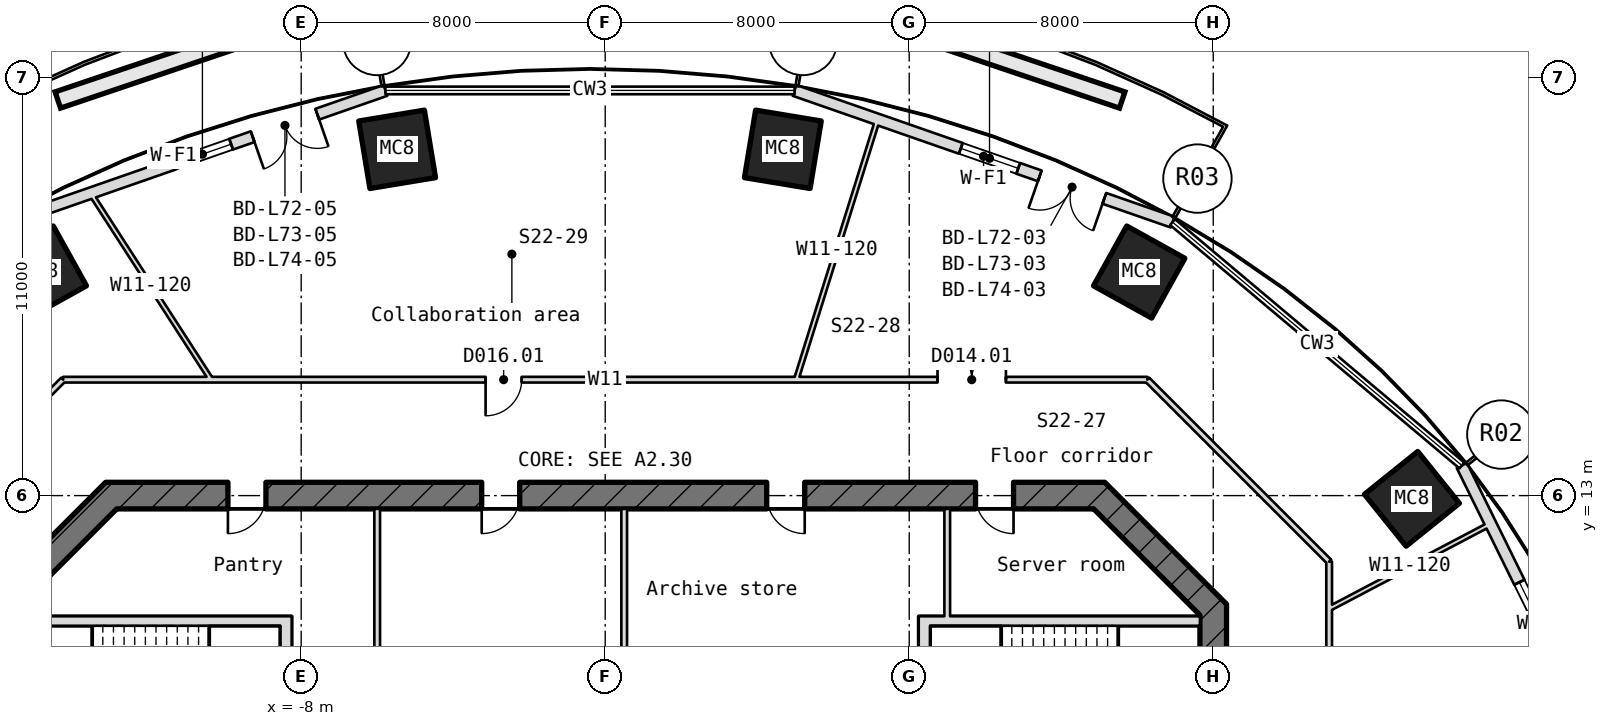
"""IFC4 building model, lengths in metres.
Left out: names, types, materials, properties, quantities, classifications, styles, units other than length and angle.
Written with IfcOpenShell. Run it as: python <this file> out.ifc"""

import sys

from ifc_helpers import new_model, si_unit, direction, frame, frame_2d, origin, origin_2d, place, context, subcontext, project, spatial, rectangle, hollow_rectangle, extrude, element, fill, save


model = new_model("IFC4")
c1 = context("Model", 3, precision=1e-05, world=origin(), true_north=direction((0.0, 1.0)))
c2 = subcontext(c1, "Body", "Model", "MODEL_VIEW")
j1 = project(units=[si_unit("LENGTHUNIT", "METRE"), si_unit("PLANEANGLEUNIT", "RADIAN")], contexts=[c1])
p1 = place(None, origin())
s1 = spatial("IfcSite", under=j1, at=p1, CompositionType="ELEMENT")
p2 = place(p1, origin())
s2 = spatial("IfcBuilding", under=s1, at=p2, CompositionType="ELEMENT")
p3 = place(p2, frame((0.0, 0.0, 321.85)))
s3 = spatial("IfcBuildingStorey", under=s2, at=p3, CompositionType="ELEMENT", Elevation=321.85)
for number, where, z_axis, x_axis in (
    (1, (21.228, 12.915, -0.18), (0.0, 0.0, 1.0), (0.626, -0.779, 0.0)),
    (2, (14.052, 18.882, -0.18), (0.0, 0.0, 1.0), (0.874, -0.486, 0.0)),
    (3, (4.675, 22.111, -0.18), (0.0, 0.0, 1.0), (0.987, -0.163, 0.0)),
    (4, (-5.475, 22.111, -0.18), (0.0, 0.0, 1.0), (0.987, 0.163, 0.0)),
    (5, (-14.852, 18.882, -0.18), (0.0, 0.0, 1.0), (0.874, 0.486, 0.0)),
):
    element("IfcColumn", number, at=place(p3, frame(where, z_axis=z_axis, x_axis=x_axis)), inside=s3, PredefinedType="COLUMN", context=c2, shape_type="SweptSolid", body=[
        extrude(hollow_rectangle(XDim=1.75, YDim=1.8, WallThickness=0.055, at=origin_2d()), origin(), (0.0, 0.0, 1.0), 4.15),
    ])
p4 = place(p3, frame((26.662, 5.427, 0.0), z_axis=(0.0, 0.0, 1.0), x_axis=(-0.441801707928, 0.897112730303, 0.0)))
e6 = element("IfcWall", 6, at=p4, inside=s3, PredefinedType="SOLIDWALL", context=c2, shape_type="SweptSolid", body=[
    extrude(rectangle(XDim=9.325, YDim=0.3, at=frame_2d((4.663, 0.0))), origin(), (0.0, 0.0, 1.0), 3.97),
])
p5 = place(p4, frame((1.9, 0.0, 0.0)))
e7 = element("IfcOpeningElement", 7, at=p5, cuts=e6, PredefinedType="OPENING", context=c2, shape_type="SweptSolid", body=[
    extrude(rectangle(XDim=1.8, YDim=2.4, at=frame_2d((0.9, 1.2))), frame((0.0, 0.16, 0.0), z_axis=(0.0, -1.0, 0.0), x_axis=(1.0, 0.0, 0.0)), (0.0, 0.0, 1.0), 0.32),
])
p6 = place(p4, frame((4.3, 0.0, 0.9)))
e8 = element("IfcOpeningElement", 8, at=p6, cuts=e6, PredefinedType="OPENING", context=c2, shape_type="SweptSolid", body=[
    extrude(rectangle(XDim=1.6, YDim=1.5, at=frame_2d((0.8, 0.75))), frame((0.0, 0.16, 0.0), z_axis=(0.0, -1.0, 0.0), x_axis=(1.0, 0.0, 0.0)), (0.0, 0.0, 1.0), 0.32),
])
p7 = place(p3, frame((14.929, 20.196, 0.0), z_axis=(0.0, 0.0, 1.0), x_axis=(-0.944327184146, 0.329007855959, 0.0)))
e9 = element("IfcWall", 9, at=p7, inside=s3, PredefinedType="SOLIDWALL", context=c2, shape_type="SweptSolid", body=[
    extrude(rectangle(XDim=10.533, YDim=0.3, at=frame_2d((5.266, 0.0))), origin(), (0.0, 0.0, 1.0), 3.97),
])
p8 = place(p7, frame((1.9, 0.0, 0.0)))
e10 = element("IfcOpeningElement", 10, at=p8, cuts=e9, PredefinedType="OPENING", context=c2, shape_type="SweptSolid", body=[
    extrude(rectangle(XDim=1.8, YDim=2.4, at=frame_2d((0.9, 1.2))), frame((0.0, 0.16, 0.0), z_axis=(0.0, -1.0, 0.0), x_axis=(1.0, 0.0, 0.0)), (0.0, 0.0, 1.0), 0.32),
])
p9 = place(p7, frame((4.3, 0.0, 0.9)))
e11 = element("IfcOpeningElement", 11, at=p9, cuts=e9, PredefinedType="OPENING", context=c2, shape_type="SweptSolid", body=[
    extrude(rectangle(XDim=1.6, YDim=1.5, at=frame_2d((0.8, 0.75))), frame((0.0, 0.16, 0.0), z_axis=(0.0, -1.0, 0.0), x_axis=(1.0, 0.0, 0.0)), (0.0, 0.0, 1.0), 0.32),
])
p10 = place(p3, frame((-5.783, 23.661, 0.0), z_axis=(0.0, 0.0, 1.0), x_axis=(-0.944327184146, -0.329007855959, 0.0)))
e12 = element("IfcWall", 12, at=p10, inside=s3, PredefinedType="SOLIDWALL", context=c2, shape_type="SweptSolid", body=[
    extrude(rectangle(XDim=10.533, YDim=0.3, at=frame_2d((5.266, 0.0))), origin(), (0.0, 0.0, 1.0), 3.97),
])
p11 = place(p10, frame((1.9, 0.0, 0.0)))
e13 = element("IfcOpeningElement", 13, at=p11, cuts=e12, PredefinedType="OPENING", context=c2, shape_type="SweptSolid", body=[
    extrude(rectangle(XDim=1.8, YDim=2.4, at=frame_2d((0.9, 1.2))), frame((0.0, 0.16, 0.0), z_axis=(0.0, -1.0, 0.0), x_axis=(1.0, 0.0, 0.0)), (0.0, 0.0, 1.0), 0.32),
])
p12 = place(p10, frame((4.3, 0.0, 0.9)))
e14 = element("IfcOpeningElement", 14, at=p12, cuts=e12, PredefinedType="OPENING", context=c2, shape_type="SweptSolid", body=[
    extrude(rectangle(XDim=1.6, YDim=1.5, at=frame_2d((0.8, 0.75))), frame((0.0, 0.16, 0.0), z_axis=(0.0, -1.0, 0.0), x_axis=(1.0, 0.0, 0.0)), (0.0, 0.0, 1.0), 0.32),
])
p13 = place(p3, frame((16.0, -10.145, -0.18), z_axis=(0.0, 0.0, 1.0), x_axis=(0.0, 1.0, 0.0)))
e15 = element("IfcWall", 15, at=p13, inside=s3, PredefinedType="SHEAR", context=c2, shape_type="SweptSolid", body=[
    extrude(rectangle(XDim=20.29, YDim=0.7, at=frame_2d((10.145, 0.0))), origin(), (0.0, 0.0, 1.0), 4.15),
])
p14 = place(p13, frame((8.945, 0.0, 0.18)))
e16 = element("IfcOpeningElement", 16, at=p14, cuts=e15, PredefinedType="OPENING", context=c2, shape_type="SweptSolid", body=[
    extrude(rectangle(XDim=2.4, YDim=2.1, at=frame_2d((1.2, 1.05))), frame((0.0, 0.36, 0.0), z_axis=(0.0, -1.0, 0.0), x_axis=(1.0, 0.0, 0.0)), (0.0, 0.0, 1.0), 0.72),
])
p15 = place(p13, frame((13.545, 0.0, 0.18)))
e17 = element("IfcOpeningElement", 17, at=p15, cuts=e15, PredefinedType="OPENING", context=c2, shape_type="SweptSolid", body=[
    extrude(rectangle(XDim=1.2, YDim=2.1, at=frame_2d((0.6, 1.05))), frame((0.0, 0.36, 0.0), z_axis=(0.0, -1.0, 0.0), x_axis=(1.0, 0.0, 0.0)), (0.0, 0.0, 1.0), 0.72),
])
p16 = place(p3, frame((16.103, 9.897, -0.18), z_axis=(0.0, 0.0, 1.0), x_axis=(-0.707106781187, 0.707106781187, 0.0)))
e18 = element("IfcWall", 18, at=p16, inside=s3, PredefinedType="SHEAR", context=c2, shape_type="SweptSolid", body=[
    extrude(rectangle(XDim=4.533, YDim=0.7, at=frame_2d((2.266, 0.0))), origin(), (0.0, 0.0, 1.0), 4.15),
])
p17 = place(p3, frame((13.145, 13.0, -0.18), z_axis=(0.0, 0.0, 1.0), x_axis=(-1.0, 0.0, 0.0)))
e19 = element("IfcWall", 19, at=p17, inside=s3, PredefinedType="SHEAR", context=c2, shape_type="SweptSolid", body=[
    extrude(rectangle(XDim=26.29, YDim=0.7, at=frame_2d((13.145, 0.0))), origin(), (0.0, 0.0, 1.0), 4.15),
])
p18 = place(p17, frame((22.073, 0.0, 0.18)))
e20 = element("IfcOpeningElement", 20, at=p18, cuts=e19, PredefinedType="OPENING", context=c2, shape_type="SweptSolid", body=[
    extrude(rectangle(XDim=1.0, YDim=2.1, at=frame_2d((0.5, 1.05))), frame((0.0, 0.36, 0.0), z_axis=(0.0, -1.0, 0.0), x_axis=(1.0, 0.0, 0.0)), (0.0, 0.0, 1.0), 0.72),
])
p19 = place(p17, frame((15.395, 0.0, 0.18)))
e21 = element("IfcOpeningElement", 21, at=p19, cuts=e19, PredefinedType="OPENING", context=c2, shape_type="SweptSolid", body=[
    extrude(rectangle(XDim=1.0, YDim=2.1, at=frame_2d((0.5, 1.05))), frame((0.0, 0.36, 0.0), z_axis=(0.0, -1.0, 0.0), x_axis=(1.0, 0.0, 0.0)), (0.0, 0.0, 1.0), 0.72),
])
p20 = place(p17, frame((7.895, 0.0, 0.18)))
e22 = element("IfcOpeningElement", 22, at=p20, cuts=e19, PredefinedType="OPENING", context=c2, shape_type="SweptSolid", body=[
    extrude(rectangle(XDim=1.0, YDim=2.1, at=frame_2d((0.5, 1.05))), frame((0.0, 0.36, 0.0), z_axis=(0.0, -1.0, 0.0), x_axis=(1.0, 0.0, 0.0)), (0.0, 0.0, 1.0), 0.72),
])
p21 = place(p17, frame((2.4, 0.0, 0.18)))
e23 = element("IfcOpeningElement", 23, at=p21, cuts=e19, PredefinedType="OPENING", context=c2, shape_type="SweptSolid", body=[
    extrude(rectangle(XDim=1.0, YDim=2.1, at=frame_2d((0.5, 1.05))), frame((0.0, 0.36, 0.0), z_axis=(0.0, -1.0, 0.0), x_axis=(1.0, 0.0, 0.0)), (0.0, 0.0, 1.0), 0.72),
])
p22 = place(p3, frame((-12.897, 13.103, -0.18), z_axis=(0.0, 0.0, 1.0), x_axis=(-0.707106781187, -0.707106781187, 0.0)))
e24 = element("IfcWall", 24, at=p22, inside=s3, PredefinedType="SHEAR", context=c2, shape_type="SweptSolid", body=[
    extrude(rectangle(XDim=4.533, YDim=0.7, at=frame_2d((2.266, 0.0))), origin(), (0.0, 0.0, 1.0), 4.15),
])
for number, where, z_axis, x_axis in (
    (25, (-15.65, 9.7, -0.18), (0.0, 0.0, 1.0), (1.0, 0.0, 0.0)),
    (26, (8.55, 9.7, -0.18), (0.0, 0.0, 1.0), (1.0, 0.0, 0.0)),
):
    element("IfcWall", number, at=place(p3, frame(where, z_axis=z_axis, x_axis=x_axis)), inside=s3, PredefinedType="SHEAR", context=c2, shape_type="SweptSolid", body=[
        extrude(rectangle(XDim=7.1, YDim=0.25, at=frame_2d((3.55, 0.0))), origin(), (0.0, 0.0, 1.0), 4.15),
    ])
p23 = place(p3, frame((-8.4, 8.35, -0.18), z_axis=(0.0, 0.0, 1.0), x_axis=(0.0, 1.0, 0.0)))
e27 = element("IfcWall", 27, at=p23, inside=s3, PredefinedType="SHEAR", context=c2, shape_type="SweptSolid", body=[
    extrude(rectangle(XDim=1.475, YDim=0.3, at=frame_2d((0.737, 0.0))), origin(), (0.0, 0.0, 1.0), 4.15),
])
for number, where, z_axis, x_axis in (
    (28, (-6.0, 5.425, 0.0), (0.0, 0.0, 1.0), (0.0, 1.0, 0.0)),
    (29, (0.5, 5.425, 0.0), (0.0, 0.0, 1.0), (0.0, 1.0, 0.0)),
):
    element("IfcWall", number, at=place(p3, frame(where, z_axis=z_axis, x_axis=x_axis)), inside=s3, PredefinedType="PARTITIONING", context=c2, shape_type="SweptSolid", body=[
        extrude(rectangle(XDim=7.225, YDim=0.15, at=frame_2d((3.612, 0.0))), origin(), (0.0, 0.0, 1.0), 3.97),
    ])
p24 = place(p3, frame((8.4, 8.35, -0.18), z_axis=(0.0, 0.0, 1.0), x_axis=(0.0, 1.0, 0.0)))
e30 = element("IfcWall", 30, at=p24, inside=s3, PredefinedType="SHEAR", context=c2, shape_type="SweptSolid", body=[
    extrude(rectangle(XDim=1.475, YDim=0.3, at=frame_2d((0.737, 0.0))), origin(), (0.0, 0.0, 1.0), 4.15),
])
p25 = place(p3, frame((9.0, 9.825, 0.0), z_axis=(0.0, 0.0, 1.0), x_axis=(0.0, 1.0, 0.0)))
e31 = element("IfcWall", 31, at=p25, inside=s3, PredefinedType="PARTITIONING", context=c2, shape_type="SweptSolid", body=[
    extrude(rectangle(XDim=2.825, YDim=0.15, at=frame_2d((1.413, 0.0))), origin(), (0.0, 0.0, 1.0), 3.97),
])
p26 = place(p3, frame((-19.05, 11.263, 0.0), z_axis=(0.0, 0.0, 1.0), x_axis=(0.707106781187, 0.707106781187, 0.0)))
e32 = element("IfcWall", 32, at=p26, inside=s3, PredefinedType="PARTITIONING", context=c2, shape_type="SweptSolid", body=[
    extrude(rectangle(XDim=6.769, YDim=0.15, at=frame_2d((3.385, 0.0))), origin(), (0.0, 0.0, 1.0), 3.97),
])
p27 = place(p3, frame((-14.263, 16.05, 0.0), z_axis=(0.0, 0.0, 1.0), x_axis=(1.0, 0.0, 0.0)))
e33 = element("IfcWall", 33, at=p27, inside=s3, PredefinedType="PARTITIONING", context=c2, shape_type="SweptSolid", body=[
    extrude(rectangle(XDim=28.527, YDim=0.15, at=frame_2d((14.263, 0.0))), origin(), (0.0, 0.0, 1.0), 3.97),
])
p28 = place(p27, frame((23.008, 0.0, 0.0)))
e34 = element("IfcOpeningElement", 34, at=p28, cuts=e33, PredefinedType="OPENING", context=c2, shape_type="SweptSolid", body=[
    extrude(rectangle(XDim=1.8, YDim=2.1, at=frame_2d((0.9, 1.05))), frame((0.0, 0.085, 0.0), z_axis=(0.0, -1.0, 0.0), x_axis=(1.0, 0.0, 0.0)), (0.0, 0.0, 1.0), 0.17),
])
p29 = place(p27, frame((11.116, 0.0, 0.0)))
e35 = element("IfcOpeningElement", 35, at=p29, cuts=e33, PredefinedType="OPENING", context=c2, shape_type="SweptSolid", body=[
    extrude(rectangle(XDim=0.95, YDim=2.1, at=frame_2d((0.475, 1.05))), frame((0.0, 0.085, 0.0), z_axis=(0.0, -1.0, 0.0), x_axis=(1.0, 0.0, 0.0)), (0.0, 0.0, 1.0), 0.17),
])
p30 = place(p3, frame((-10.371, 16.05, 0.0), z_axis=(0.0, 0.0, 1.0), x_axis=(-0.542726268586, 0.839909636441, 0.0)))
e36 = element("IfcWall", 36, at=p30, inside=s3, PredefinedType="PARTITIONING", context=c2, shape_type="SweptSolid", body=[
    extrude(rectangle(XDim=5.844, YDim=0.12, at=frame_2d((2.922, 0.0))), origin(), (0.0, 0.0, 1.0), 3.97),
])
p31 = place(p3, frame((5.026, 16.05, 0.0), z_axis=(0.0, 0.0, 1.0), x_axis=(0.29884634182, 0.954301243833, 0.0)))
e37 = element("IfcWall", 37, at=p31, inside=s3, PredefinedType="PARTITIONING", context=c2, shape_type="SweptSolid", body=[
    extrude(rectangle(XDim=7.177, YDim=0.12, at=frame_2d((3.588, 0.0))), origin(), (0.0, 0.0, 1.0), 3.97),
])
p32 = place(p3, frame((14.263, 16.05, 0.0), z_axis=(0.0, 0.0, 1.0), x_axis=(0.707106781187, -0.707106781187, 0.0)))
e38 = element("IfcWall", 38, at=p32, inside=s3, PredefinedType="PARTITIONING", context=c2, shape_type="SweptSolid", body=[
    extrude(rectangle(XDim=6.769, YDim=0.15, at=frame_2d((3.385, 0.0))), origin(), (0.0, 0.0, 1.0), 3.97),
])
p33 = place(p3, frame((19.05, 10.022, 0.0), z_axis=(0.0, 0.0, 1.0), x_axis=(0.885000946398, 0.465589223323, 0.0)))
e39 = element("IfcWall", 39, at=p33, inside=s3, PredefinedType="PARTITIONING", context=c2, shape_type="SweptSolid", body=[
    extrude(rectangle(XDim=4.801, YDim=0.12, at=frame_2d((2.4, 0.0))), origin(), (0.0, 0.0, 1.0), 3.97),
])
p34 = place(p3, frame((19.05, 11.263, 0.0), z_axis=(0.0, 0.0, 1.0), x_axis=(0.0, -1.0, 0.0)))
e40 = element("IfcWall", 40, at=p34, inside=s3, PredefinedType="PARTITIONING", context=c2, shape_type="SweptSolid", body=[
    extrude(rectangle(XDim=22.527, YDim=0.15, at=frame_2d((11.263, 0.0))), origin(), (0.0, 0.0, 1.0), 3.97),
])
p35 = place(p34, frame((7.251, 0.0, 0.0)))
e41 = element("IfcOpeningElement", 41, at=p35, cuts=e40, PredefinedType="OPENING", context=c2, shape_type="SweptSolid", body=[
    extrude(rectangle(XDim=1.8, YDim=2.1, at=frame_2d((0.9, 1.05))), frame((0.0, 0.085, 0.0), z_axis=(0.0, -1.0, 0.0), x_axis=(1.0, 0.0, 0.0)), (0.0, 0.0, 1.0), 0.17),
])
p36 = place(p6, origin())
e42 = element("IfcWindow", 42, at=p36, inside=s3, PartitioningType="SINGLE_PANEL", PredefinedType="WINDOW", context=c2, shape_type="SweptSolid", body=[
    extrude(rectangle(XDim=1.6, YDim=1.5, at=frame_2d((0.8, 0.75))), frame((0.0, 0.03, 0.0), z_axis=(0.0, -1.0, 0.0), x_axis=(1.0, 0.0, 0.0)), (0.0, 0.0, 1.0), 0.06),
])
fill(e8, e42)
p37 = place(p8, origin())
e43 = element("IfcDoor", 43, at=p37, inside=s3, OperationType="SINGLE_SWING_LEFT", PredefinedType="DOOR", context=c2, shape_type="SweptSolid", body=[
    extrude(rectangle(XDim=1.8, YDim=2.4, at=frame_2d((0.9, 1.2))), frame((0.0, 0.025, 0.0), z_axis=(0.0, -1.0, 0.0), x_axis=(1.0, 0.0, 0.0)), (0.0, 0.0, 1.0), 0.05),
])
fill(e10, e43)
p38 = place(p9, origin())
e44 = element("IfcWindow", 44, at=p38, inside=s3, PartitioningType="SINGLE_PANEL", PredefinedType="WINDOW", context=c2, shape_type="SweptSolid", body=[
    extrude(rectangle(XDim=1.6, YDim=1.5, at=frame_2d((0.8, 0.75))), frame((0.0, 0.03, 0.0), z_axis=(0.0, -1.0, 0.0), x_axis=(1.0, 0.0, 0.0)), (0.0, 0.0, 1.0), 0.06),
])
fill(e11, e44)
p39 = place(p11, origin())
e45 = element("IfcDoor", 45, at=p39, inside=s3, OperationType="SINGLE_SWING_LEFT", PredefinedType="DOOR", context=c2, shape_type="SweptSolid", body=[
    extrude(rectangle(XDim=1.8, YDim=2.4, at=frame_2d((0.9, 1.2))), frame((0.0, 0.025, 0.0), z_axis=(0.0, -1.0, 0.0), x_axis=(1.0, 0.0, 0.0)), (0.0, 0.0, 1.0), 0.05),
])
fill(e13, e45)
p40 = place(p12, origin())
e46 = element("IfcWindow", 46, at=p40, inside=s3, PartitioningType="SINGLE_PANEL", PredefinedType="WINDOW", context=c2, shape_type="SweptSolid", body=[
    extrude(rectangle(XDim=1.6, YDim=1.5, at=frame_2d((0.8, 0.75))), frame((0.0, 0.03, 0.0), z_axis=(0.0, -1.0, 0.0), x_axis=(1.0, 0.0, 0.0)), (0.0, 0.0, 1.0), 0.06),
])
fill(e14, e46)
p41 = place(p18, origin())
e47 = element("IfcDoor", 47, at=p41, inside=s3, OperationType="SINGLE_SWING_RIGHT", PredefinedType="DOOR", context=c2, shape_type="SweptSolid", body=[
    extrude(rectangle(XDim=1.0, YDim=2.1, at=frame_2d((0.5, 1.05))), frame((0.0, 0.025, 0.0), z_axis=(0.0, -1.0, 0.0), x_axis=(1.0, 0.0, 0.0)), (0.0, 0.0, 1.0), 0.05),
])
fill(e20, e47)
p42 = place(p19, origin())
e48 = element("IfcDoor", 48, at=p42, inside=s3, OperationType="SINGLE_SWING_RIGHT", PredefinedType="DOOR", context=c2, shape_type="SweptSolid", body=[
    extrude(rectangle(XDim=1.0, YDim=2.1, at=frame_2d((0.5, 1.05))), frame((0.0, 0.025, 0.0), z_axis=(0.0, -1.0, 0.0), x_axis=(1.0, 0.0, 0.0)), (0.0, 0.0, 1.0), 0.05),
])
fill(e21, e48)
p43 = place(p20, origin())
e49 = element("IfcDoor", 49, at=p43, inside=s3, OperationType="SINGLE_SWING_RIGHT", PredefinedType="DOOR", context=c2, shape_type="SweptSolid", body=[
    extrude(rectangle(XDim=1.0, YDim=2.1, at=frame_2d((0.5, 1.05))), frame((0.0, 0.025, 0.0), z_axis=(0.0, -1.0, 0.0), x_axis=(1.0, 0.0, 0.0)), (0.0, 0.0, 1.0), 0.05),
])
fill(e22, e49)
p44 = place(p21, origin())
e50 = element("IfcDoor", 50, at=p44, inside=s3, OperationType="SINGLE_SWING_RIGHT", PredefinedType="DOOR", context=c2, shape_type="SweptSolid", body=[
    extrude(rectangle(XDim=1.0, YDim=2.1, at=frame_2d((0.5, 1.05))), frame((0.0, 0.025, 0.0), z_axis=(0.0, -1.0, 0.0), x_axis=(1.0, 0.0, 0.0)), (0.0, 0.0, 1.0), 0.05),
])
fill(e23, e50)
p45 = place(p28, origin())
e51 = element("IfcDoor", 51, at=p45, inside=s3, OperationType="DOUBLE_DOOR_SINGLE_SWING", PredefinedType="DOOR", context=c2, shape_type="SweptSolid", body=[
    extrude(rectangle(XDim=1.8, YDim=2.1, at=frame_2d((0.9, 1.05))), frame((0.0, 0.025, 0.0), z_axis=(0.0, -1.0, 0.0), x_axis=(1.0, 0.0, 0.0)), (0.0, 0.0, 1.0), 0.05),
])
fill(e34, e51)
p46 = place(p29, frame((0.95, 0.0, 0.0), z_axis=(0.0, 0.0, 1.0), x_axis=(-1.0, 0.0, 0.0)))
e52 = element("IfcDoor", 52, at=p46, inside=s3, OperationType="SINGLE_SWING_LEFT", PredefinedType="DOOR", context=c2, shape_type="SweptSolid", body=[
    extrude(rectangle(XDim=0.95, YDim=2.1, at=frame_2d((0.475, 1.05))), frame((0.0, 0.025, 0.0), z_axis=(0.0, -1.0, 0.0), x_axis=(1.0, 0.0, 0.0)), (0.0, 0.0, 1.0), 0.05),
])
fill(e35, e52)
save(model, sys.argv[1])
